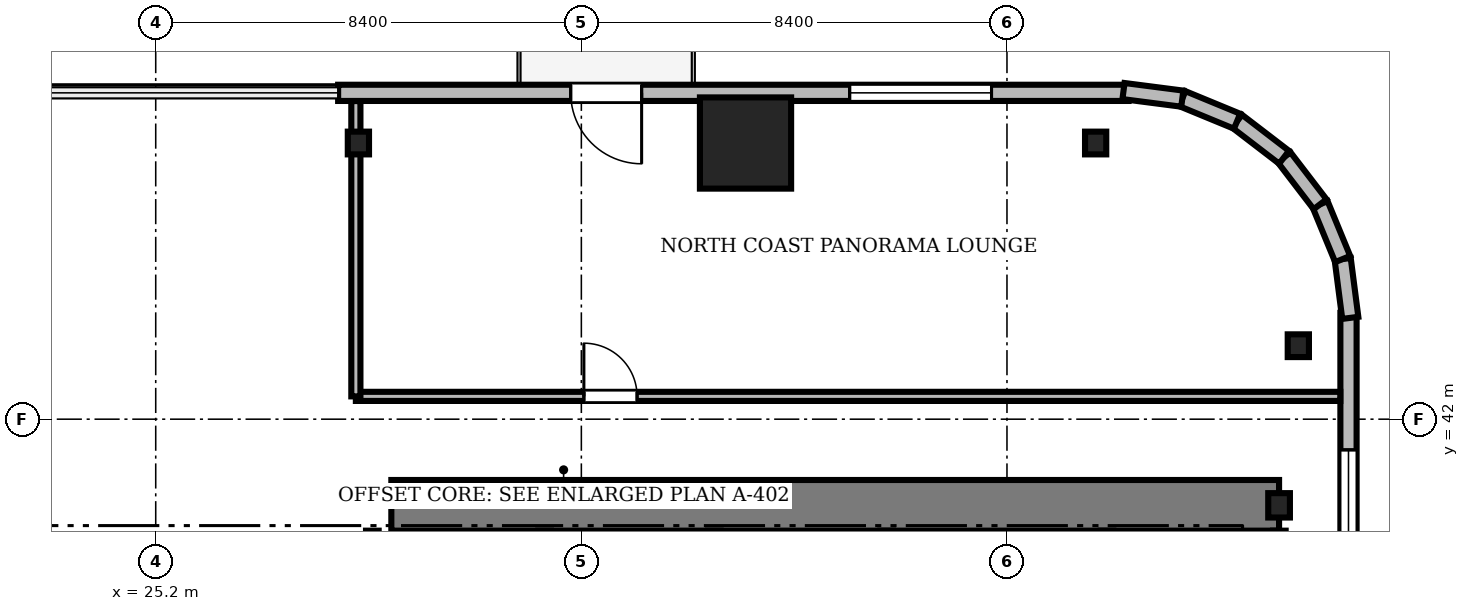
"""IFC4 building model, lengths in metres.
Left out: names, types, materials, properties, quantities, classifications, styles, units other than length and angle.
Written with IfcOpenShell. Run it as: python <this file> out.ifc"""

import sys

from ifc_helpers import new_model, si_unit, direction, frame, frame_2d, origin, origin_2d, place, context, subcontext, project, spatial, rectangle, i_section, extrude, source, transform, mapped, element, fill, save


model = new_model("IFC4")
c1 = context("Model", 3, precision=1e-05, world=origin(), true_north=direction((0.0, 1.0)))
c2 = subcontext(c1, "Body", "Model", "MODEL_VIEW")
j1 = project(units=[si_unit("LENGTHUNIT", "METRE"), si_unit("PLANEANGLEUNIT", "RADIAN")], contexts=[c1])
p1 = place(None, origin())
s1 = spatial("IfcSite", under=j1, at=p1, CompositionType="ELEMENT")
p2 = place(p1, origin())
s2 = spatial("IfcBuilding", under=s1, at=p2, CompositionType="ELEMENT")
p3 = place(p2, frame((0.0, 0.0, 56.8)))
s3 = spatial("IfcBuildingStorey", under=s2, at=p3, CompositionType="ELEMENT", Elevation=56.8)
m1 = source(origin(), c2, "Body", "SweptSolid", [
    extrude(rectangle(XDim=17.52, YDim=1.0, at=frame_2d((8.76, 0.0))), origin(), (0.0, 0.0, 1.0), 3.41),
])
p4 = place(p3, frame((29.85, 40.3, 0.0), z_axis=(0.0, 0.0, 1.0), x_axis=(1.0, 0.0, 0.0)))
e1 = element("IfcWall", 1, at=p4, inside=s3, PredefinedType="SHEAR", context=c2, shape_type="MappedRepresentation", body=[
    mapped(m1, transform((0.0, 0.0, 0.0), scale=1.0)),
])
m2 = source(origin(), c2, "Body", "SweptSolid", [
    extrude(i_section(OverallWidth=0.428, OverallDepth=0.481, WebThickness=0.04, FlangeThickness=0.063, FilletRadius=0.015, at=origin_2d()), origin(), (0.0, 0.0, 1.0), 3.41),
])
p5 = place(p3, frame((47.37, 40.3, 0.0), z_axis=(0.0, 0.0, 1.0), x_axis=(1.0, 0.0, 0.0)))
e2 = element("IfcColumn", 2, at=p5, inside=s3, PredefinedType="COLUMN", context=c2, shape_type="MappedRepresentation", body=[
    mapped(m2, transform((0.0, 0.0, 0.0), scale=1.0)),
])
m3 = source(origin(), c2, "Body", "SweptSolid", [
    extrude(rectangle(XDim=1.8, YDim=1.8, at=origin_2d()), origin(), (0.0, 0.0, 1.0), 3.41),
])
p6 = place(p3, frame((36.84, 47.45, 0.0), z_axis=(0.0, 0.0, 1.0), x_axis=(1.0, 0.0, 0.0)))
e3 = element("IfcColumn", 3, at=p6, inside=s3, PredefinedType="COLUMN", context=c2, shape_type="MappedRepresentation", body=[
    mapped(m3, transform((0.0, 0.0, 0.0), scale=1.0)),
])
m4 = source(origin(), c2, "Body", "SweptSolid", [
    extrude(i_section(OverallWidth=0.419, OverallDepth=0.449, WebThickness=0.031, FlangeThickness=0.048, FilletRadius=0.015, at=origin_2d()), origin(), (0.0, 0.0, 1.0), 3.41),
])
for number, where, z_axis, x_axis in (
    (4, (47.75, 43.45, 0.0), (0.0, 0.0, 1.0), (1.0, 0.0, 0.0)),
    (5, (43.75, 47.45, 0.0), (0.0, 0.0, 1.0), (1.0, 0.0, 0.0)),
    (6, (29.2, 47.45, 0.0), (0.0, 0.0, 1.0), (1.0, 0.0, 0.0)),
):
    element("IfcColumn", number, at=place(p3, frame(where, z_axis=z_axis, x_axis=x_axis)), inside=s3, PredefinedType="COLUMN", context=c2, shape_type="MappedRepresentation", body=[
        mapped(m4, transform((0.0, 0.0, 0.0), scale=1.0)),
    ])
m5 = source(origin(), c2, "Body", "SweptSolid", [
    extrude(rectangle(XDim=15.6, YDim=0.32, at=frame_2d((7.8, 0.0))), origin(), (0.0, 0.0, 1.0), 3.41),
])
p7 = place(p3, frame((44.4, 48.44, 0.0), z_axis=(0.0, 0.0, 1.0), x_axis=(-1.0, 0.0, 0.0)))
e7 = element("IfcWall", 7, at=p7, inside=s3, PredefinedType="SOLIDWALL", context=c2, shape_type="MappedRepresentation", body=[
    mapped(m5, transform((0.0, 0.0, 0.0), scale=1.0)),
])
m6 = source(origin(), c2, "Body", "SweptSolid", [
    extrude(rectangle(XDim=1.4, YDim=2.3, at=frame_2d((0.7, 1.15))), frame((0.0, 0.17, 0.0), z_axis=(0.0, -1.0, 0.0), x_axis=(1.0, 0.0, 0.0)), (0.0, 0.0, 1.0), 0.34),
])
p8 = place(p7, frame((9.61, 0.0, 0.0)))
e8 = element("IfcOpeningElement", 8, at=p8, cuts=e7, PredefinedType="OPENING", context=c2, shape_type="MappedRepresentation", body=[
    mapped(m6, transform((0.0, 0.0, 0.0), scale=1.0)),
])
m7 = source(origin(), c2, "Body", "SweptSolid", [
    extrude(rectangle(XDim=2.8, YDim=2.4, at=frame_2d((1.4, 1.2))), frame((0.0, 0.17, 0.0), z_axis=(0.0, -1.0, 0.0), x_axis=(1.0, 0.0, 0.0)), (0.0, 0.0, 1.0), 0.34),
])
p9 = place(p7, frame((2.705, 0.0, 0.72)))
e9 = element("IfcOpeningElement", 9, at=p9, cuts=e7, PredefinedType="OPENING", context=c2, shape_type="MappedRepresentation", body=[
    mapped(m7, transform((0.0, 0.0, 0.0), scale=1.0)),
])
m8 = source(origin(), c2, "Body", "SweptSolid", [
    extrude(rectangle(XDim=15.6, YDim=0.32, at=frame_2d((7.8, 0.0))), origin(), (0.0, 0.0, 1.0), 3.41),
])
p10 = place(p3, frame((48.74, 28.5, 0.0), z_axis=(0.0, 0.0, 1.0), x_axis=(0.0, 1.0, 0.0)))
e10 = element("IfcWall", 10, at=p10, inside=s3, PredefinedType="SOLIDWALL", context=c2, shape_type="MappedRepresentation", body=[
    mapped(m8, transform((0.0, 0.0, 0.0), scale=1.0)),
])
p11 = place(p10, frame((10.095, 0.0, 0.72)))
e11 = element("IfcOpeningElement", 11, at=p11, cuts=e10, PredefinedType="OPENING", context=c2, shape_type="MappedRepresentation", body=[
    mapped(m7, transform((0.0, 0.0, 0.0), scale=1.0)),
])
m9 = source(origin(), c2, "Body", "SweptSolid", [
    extrude(rectangle(XDim=1.17, YDim=0.32, at=frame_2d((0.585, 0.0))), origin(), (0.0, 0.0, 1.0), 3.41),
])
p12 = place(p3, frame((48.776, 44.0, 0.0), z_axis=(0.0, 0.0, 1.0), x_axis=(-0.128295670475, 0.991735963317, 0.0)))
e12 = element("IfcWall", 12, at=p12, inside=s3, PredefinedType="SOLIDWALL", context=c2, shape_type="MappedRepresentation", body=[
    mapped(m9, transform((0.0, 0.0, 0.0), scale=1.0)),
])
m10 = source(origin(), c2, "Body", "SweptSolid", [
    extrude(rectangle(XDim=1.169, YDim=0.32, at=frame_2d((0.584, 0.0))), origin(), (0.0, 0.0, 1.0), 3.41),
])
p13 = place(p3, frame((48.625, 45.16, 0.0), z_axis=(0.0, 0.0, 1.0), x_axis=(-0.381054331552, 0.924552646638, 0.0)))
e13 = element("IfcWall", 13, at=p13, inside=s3, PredefinedType="SOLIDWALL", context=c2, shape_type="MappedRepresentation", body=[
    mapped(m10, transform((0.0, 0.0, 0.0), scale=1.0)),
])
m11 = source(origin(), c2, "Body", "SweptSolid", [
    extrude(rectangle(XDim=1.169, YDim=0.32, at=frame_2d((0.584, 0.0))), origin(), (0.0, 0.0, 1.0), 3.41),
])
p14 = place(p3, frame((48.18, 46.241, 0.0), z_axis=(0.0, 0.0, 1.0), x_axis=(-0.608387696831, 0.793639975269, 0.0)))
e14 = element("IfcWall", 14, at=p14, inside=s3, PredefinedType="SOLIDWALL", context=c2, shape_type="MappedRepresentation", body=[
    mapped(m11, transform((0.0, 0.0, 0.0), scale=1.0)),
])
m12 = source(origin(), c2, "Body", "SweptSolid", [
    extrude(rectangle(XDim=1.169, YDim=0.32, at=frame_2d((0.584, 0.0))), origin(), (0.0, 0.0, 1.0), 3.41),
])
p15 = place(p3, frame((47.469, 47.169, 0.0), z_axis=(0.0, 0.0, 1.0), x_axis=(-0.793663520347, 0.608356981114, 0.0)))
e15 = element("IfcWall", 15, at=p15, inside=s3, PredefinedType="SOLIDWALL", context=c2, shape_type="MappedRepresentation", body=[
    mapped(m12, transform((0.0, 0.0, 0.0), scale=1.0)),
])
p16 = place(p3, frame((46.541, 47.88, 0.0), z_axis=(0.0, 0.0, 1.0), x_axis=(-0.924552646638, 0.381054331552, 0.0)))
e16 = element("IfcWall", 16, at=p16, inside=s3, PredefinedType="SOLIDWALL", context=c2, shape_type="MappedRepresentation", body=[
    mapped(m10, transform((0.0, 0.0, 0.0), scale=1.0)),
])
p17 = place(p3, frame((45.46, 48.325, 0.0), z_axis=(0.0, 0.0, 1.0), x_axis=(-0.991735963317, 0.128295670475, 0.0)))
e17 = element("IfcWall", 17, at=p17, inside=s3, PredefinedType="SOLIDWALL", context=c2, shape_type="MappedRepresentation", body=[
    mapped(m9, transform((0.0, 0.0, 0.0), scale=1.0)),
])
m13 = source(origin(), c2, "Body", "SweptSolid", [
    extrude(rectangle(XDim=9.15, YDim=0.25, at=frame_2d((4.575, 0.0))), origin(), (0.0, 0.0, 1.0), 3.45),
])
for number, where, z_axis, x_axis in (
    (18, (29.475, 30.65, 0.0), (0.0, 0.0, 1.0), (0.0, 1.0, 0.0)),
    (19, (32.875, 30.65, 0.0), (0.0, 0.0, 1.0), (0.0, 1.0, 0.0)),
    (20, (36.225, 30.65, 0.0), (0.0, 0.0, 1.0), (0.0, 1.0, 0.0)),
    (21, (39.625, 30.65, 0.0), (0.0, 0.0, 1.0), (0.0, 1.0, 0.0)),
    (22, (43.975, 30.65, 0.0), (0.0, 0.0, 1.0), (0.0, 1.0, 0.0)),
    (23, (47.375, 30.65, 0.0), (0.0, 0.0, 1.0), (0.0, 1.0, 0.0)),
):
    element("IfcWall", number, at=place(p3, frame(where, z_axis=z_axis, x_axis=x_axis)), inside=s3, PredefinedType="SOLIDWALL", context=c2, shape_type="MappedRepresentation", body=[
        mapped(m13, transform((0.0, 0.0, 0.0), scale=1.0)),
    ])
m14 = source(origin(), c2, "Body", "SweptSolid", [
    extrude(rectangle(XDim=19.428, YDim=0.18, at=frame_2d((9.714, 0.0))), origin(), (0.0, 0.0, 1.0), 2.652),
])
p18 = place(p3, frame((29.15, 42.45, 0.0), z_axis=(0.0, 0.0, 1.0), x_axis=(1.0, 0.0, 0.0)))
e24 = element("IfcWall", 24, at=p18, inside=s3, PredefinedType="PARTITIONING", context=c2, shape_type="MappedRepresentation", body=[
    mapped(m14, transform((0.0, 0.0, 0.0), scale=1.0)),
])
m15 = source(origin(), c2, "Body", "SweptSolid", [
    extrude(rectangle(XDim=1.05, YDim=2.2, at=frame_2d((0.525, 1.1))), frame((0.0, 0.1, 0.0), z_axis=(0.0, -1.0, 0.0), x_axis=(1.0, 0.0, 0.0)), (0.0, 0.0, 1.0), 0.2),
])
p19 = place(p18, frame((4.5, 0.0, 0.0)))
e25 = element("IfcOpeningElement", 25, at=p19, cuts=e24, PredefinedType="OPENING", context=c2, shape_type="MappedRepresentation", body=[
    mapped(m15, transform((0.0, 0.0, 0.0), scale=1.0)),
])
m16 = source(origin(), c2, "Body", "SweptSolid", [
    extrude(rectangle(XDim=5.828, YDim=0.18, at=frame_2d((2.914, 0.0))), origin(), (0.0, 0.0, 1.0), 2.652),
])
p20 = place(p3, frame((29.15, 42.45, 0.0), z_axis=(0.0, 0.0, 1.0), x_axis=(0.0, 1.0, 0.0)))
e26 = element("IfcWall", 26, at=p20, inside=s3, PredefinedType="PARTITIONING", context=c2, shape_type="MappedRepresentation", body=[
    mapped(m16, transform((0.0, 0.0, 0.0), scale=1.0)),
])
m17 = source(origin(), c2, "Body", "SweptSolid", [
    extrude(rectangle(XDim=1.4, YDim=2.3, at=frame_2d((0.7, 1.15))), frame((0.0, 0.025, 0.0), z_axis=(0.0, -1.0, 0.0), x_axis=(1.0, 0.0, 0.0)), (0.0, 0.0, 1.0), 0.05),
])
p21 = place(p8, frame((1.4, 0.0, 0.0), z_axis=(0.0, 0.0, 1.0), x_axis=(-1.0, 0.0, 0.0)))
e27 = element("IfcDoor", 27, at=p21, inside=s3, OperationType="DOUBLE_DOOR_SLIDING", PredefinedType="DOOR", context=c2, shape_type="MappedRepresentation", body=[
    mapped(m17, transform((0.0, 0.0, 0.0), scale=1.0)),
])
fill(e8, e27)
m18 = source(origin(), c2, "Body", "SweptSolid", [
    extrude(rectangle(XDim=2.8, YDim=2.4, at=frame_2d((1.4, 1.2))), frame((0.0, 0.03, 0.0), z_axis=(0.0, -1.0, 0.0), x_axis=(1.0, 0.0, 0.0)), (0.0, 0.0, 1.0), 0.06),
])
p22 = place(p9, origin())
e28 = element("IfcWindow", 28, at=p22, inside=s3, PartitioningType="SINGLE_PANEL", PredefinedType="WINDOW", context=c2, shape_type="MappedRepresentation", body=[
    mapped(m18, transform((0.0, 0.0, 0.0), scale=1.0)),
])
fill(e9, e28)
p23 = place(p11, origin())
e29 = element("IfcWindow", 29, at=p23, inside=s3, PartitioningType="SINGLE_PANEL", PredefinedType="WINDOW", context=c2, shape_type="MappedRepresentation", body=[
    mapped(m18, transform((0.0, 0.0, 0.0), scale=1.0)),
])
fill(e11, e29)
m19 = source(origin(), c2, "Body", "SweptSolid", [
    extrude(rectangle(XDim=1.05, YDim=2.2, at=frame_2d((0.525, 1.1))), frame((0.0, 0.025, 0.0), z_axis=(0.0, -1.0, 0.0), x_axis=(1.0, 0.0, 0.0)), (0.0, 0.0, 1.0), 0.05),
])
p24 = place(p19, origin())
e30 = element("IfcDoor", 30, at=p24, inside=s3, OperationType="SINGLE_SWING_LEFT", PredefinedType="DOOR", context=c2, shape_type="MappedRepresentation", body=[
    mapped(m19, transform((0.0, 0.0, 0.0), scale=1.0)),
])
fill(e25, e30)
save(model, sys.argv[1])
